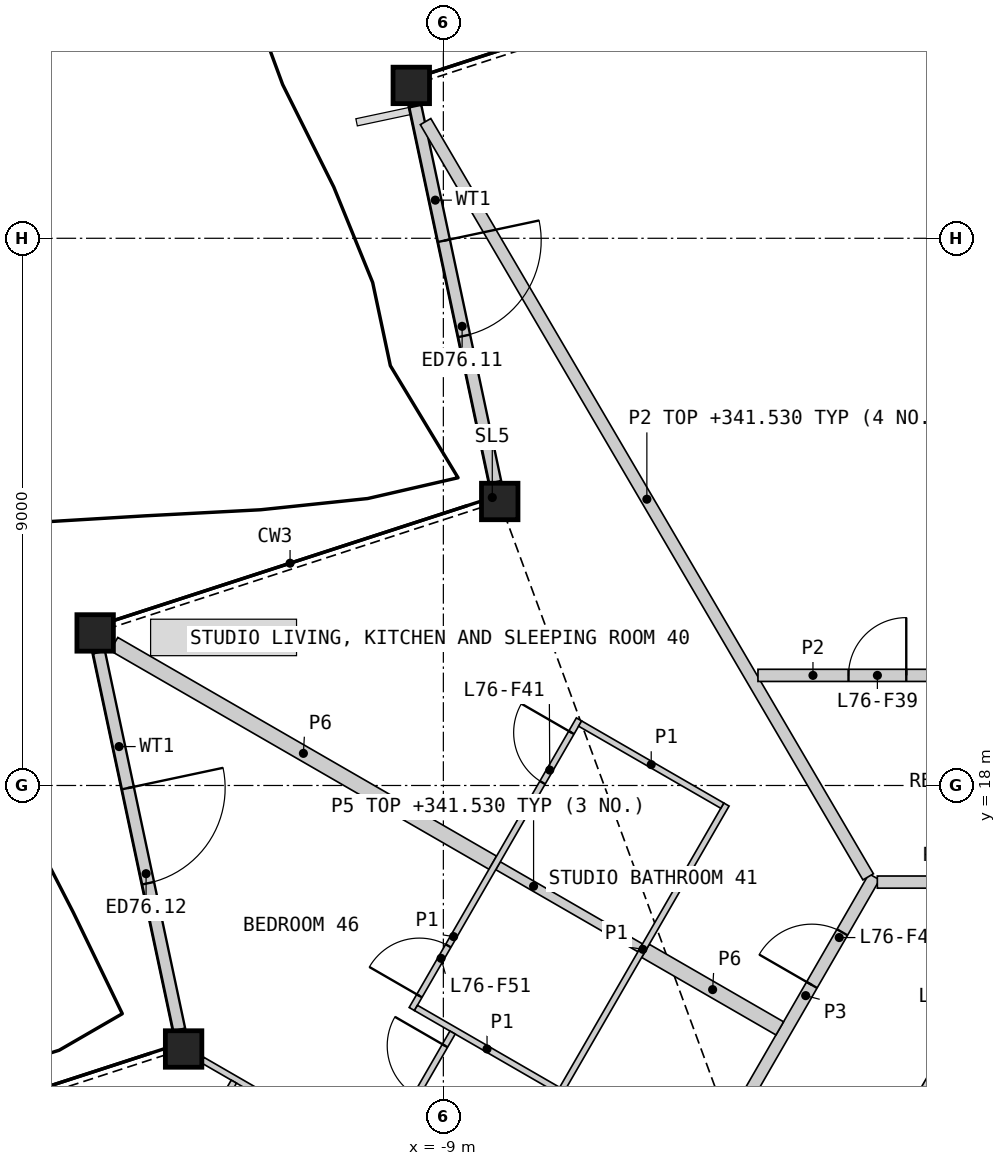
"""IFC4 building model, lengths in metres.
Left out: names, types, materials, properties, quantities, classifications, styles, units other than length and angle.
Written with IfcOpenShell. Run it as: python <this file> out.ifc"""

import sys

from ifc_helpers import new_model, si_unit, direction, frame, frame_2d, origin, origin_2d, place, context, subcontext, project, spatial, rectangle, hollow_rectangle, extrude, element, fill, save


model = new_model("IFC4")
c1 = context("Model", 3, precision=1e-05, world=origin(), true_north=direction((0.0, 1.0)))
c2 = subcontext(c1, "Body", "Model", "MODEL_VIEW")
j1 = project(units=[si_unit("LENGTHUNIT", "METRE"), si_unit("PLANEANGLEUNIT", "RADIAN")], contexts=[c1])
p1 = place(None, origin())
s1 = spatial("IfcSite", under=j1, at=p1, CompositionType="ELEMENT")
p2 = place(p1, origin())
s2 = spatial("IfcBuilding", under=s1, at=p2, CompositionType="ELEMENT")
p3 = place(p2, frame((0.0, 0.0, 339.2)))
s3 = spatial("IfcBuildingStorey", under=s2, at=p3, CompositionType="ELEMENT", Elevation=339.2)
for number, where, z_axis, x_axis in (
    (1, (-9.527, 29.514, 0.0), (0.0, 0.0, 1.0), (1.0, 0.0, 0.0)),
    (2, (-8.073, 22.671, 0.0), (0.0, 0.0, 1.0), (1.0, 0.0, 0.0)),
    (3, (-14.727, 20.509, 0.0), (0.0, 0.0, 1.0), (1.0, 0.0, 0.0)),
    (4, (-13.272, 13.666, 0.0), (0.0, 0.0, 1.0), (1.0, 0.0, 0.0)),
):
    element("IfcColumn", number, at=place(p3, frame(where, z_axis=z_axis, x_axis=x_axis)), inside=s3, PredefinedType="COLUMN", context=c2, shape_type="SweptSolid", body=[
        extrude(hollow_rectangle(XDim=0.6, YDim=0.6, WallThickness=0.04, at=origin_2d()), origin(), (0.0, 0.0, 1.0), 3.4),
    ])
p4 = place(p3, frame((-9.461, 29.174, 0.0), z_axis=(0.0, 0.0, 1.0), x_axis=(0.20791277238, -0.97814737084, 0.0)))
e5 = element("IfcWall", 5, at=p4, inside=s3, PredefinedType="SOLIDWALL", context=c2, shape_type="SweptSolid", body=[
    extrude(rectangle(XDim=6.324, YDim=0.2, at=frame_2d((3.162, 0.0))), origin(), (0.0, 0.0, 1.0), 2.488),
])
p5 = place(p4, frame((2.263, 0.0, 0.0)))
e6 = element("IfcOpeningElement", 6, at=p5, cuts=e5, PredefinedType="OPENING", context=c2, shape_type="SweptSolid", body=[
    extrude(rectangle(XDim=1.6, YDim=2.25, at=frame_2d((0.8, 1.125))), frame((0.0, 0.11, 0.0), z_axis=(0.0, -1.0, 0.0), x_axis=(1.0, 0.0, 0.0)), (0.0, 0.0, 1.0), 0.22),
])
p6 = place(p3, frame((-14.663, 20.192, 0.0), z_axis=(0.0, 0.0, 1.0), x_axis=(0.207897850695, -0.97815054244, 0.0)))
e7 = element("IfcWall", 7, at=p6, inside=s3, PredefinedType="SOLIDWALL", context=c2, shape_type="SweptSolid", body=[
    extrude(rectangle(XDim=6.348, YDim=0.2, at=frame_2d((3.174, 0.0))), origin(), (0.0, 0.0, 1.0), 2.488),
])
p7 = place(p6, frame((2.285, 0.0, 0.0)))
e8 = element("IfcOpeningElement", 8, at=p7, cuts=e7, PredefinedType="OPENING", context=c2, shape_type="SweptSolid", body=[
    extrude(rectangle(XDim=1.6, YDim=2.25, at=frame_2d((0.8, 1.125))), frame((0.0, 0.11, 0.0), z_axis=(0.0, -1.0, 0.0), x_axis=(1.0, 0.0, 0.0)), (0.0, 0.0, 1.0), 0.22),
])
p8 = place(p3, frame((-0.26, 13.961, 0.0), z_axis=(0.0, 0.0, 1.0), x_axis=(-0.49997936161, -0.866037319036, 0.0)))
e9 = element("IfcWall", 9, at=p8, inside=s3, PredefinedType="SHEAR", context=c2, shape_type="SweptSolid", body=[
    extrude(rectangle(XDim=2.66, YDim=0.6, at=frame_2d((1.33, 0.0))), origin(), (0.0, 0.0, 1.0), 3.1),
])
p9 = place(p8, frame((1.05, 0.0, 0.0)))
e10 = element("IfcOpeningElement", 10, at=p9, cuts=e9, PredefinedType="OPENING", context=c2, shape_type="SweptSolid", body=[
    extrude(rectangle(XDim=1.0, YDim=2.1, at=frame_2d((0.5, 1.05))), frame((0.0, 0.31, 0.0), z_axis=(0.0, -1.0, 0.0), x_axis=(1.0, 0.0, 0.0)), (0.0, 0.0, 1.0), 0.62),
])
p10 = place(p3, frame((-14.417, 20.327, 0.0), z_axis=(0.0, 0.0, 1.0), x_axis=(0.866018271907, -0.50001235257, 0.0)))
e11 = element("IfcWall", 11, at=p10, inside=s3, PredefinedType="PARTITIONING", context=c2, shape_type="SweptSolid", body=[
    extrude(rectangle(XDim=7.193, YDim=0.25, at=frame_2d((3.596, 0.0))), origin(), (0.0, 0.0, 1.0), 2.33),
])
p11 = place(p3, frame((-4.169, 12.59, 0.0), z_axis=(0.0, 0.0, 1.0), x_axis=(0.499950370306, 0.866054055606, 0.0)))
e12 = element("IfcWall", 12, at=p11, inside=s3, PredefinedType="PARTITIONING", context=c2, shape_type="SweptSolid", body=[
    extrude(rectangle(XDim=4.513, YDim=0.2, at=frame_2d((2.256, 0.0))), origin(), (0.0, 0.0, 1.0), 3.1),
])
p12 = place(p11, frame((2.459, 0.0, 0.0)))
e13 = element("IfcOpeningElement", 13, at=p12, cuts=e12, PredefinedType="OPENING", context=c2, shape_type="SweptSolid", body=[
    extrude(rectangle(XDim=1.0, YDim=2.1, at=frame_2d((0.5, 1.05))), frame((0.0, 0.11, 0.0), z_axis=(0.0, -1.0, 0.0), x_axis=(1.0, 0.0, 0.0)), (0.0, 0.0, 1.0), 0.22),
])
p13 = place(p3, frame((-1.863, 16.411, 0.0), z_axis=(0.0, 0.0, 1.0), x_axis=(1.0, 0.0, 0.0)))
e14 = element("IfcWall", 14, at=p13, inside=s3, PredefinedType="PARTITIONING", context=c2, shape_type="SweptSolid", body=[
    extrude(rectangle(XDim=3.726, YDim=0.2, at=frame_2d((1.863, 0.0))), origin(), (0.0, 0.0, 1.0), 3.1),
])
p14 = place(p13, frame((1.388, 0.0, 0.0)))
e15 = element("IfcOpeningElement", 15, at=p14, cuts=e14, PredefinedType="OPENING", context=c2, shape_type="SweptSolid", body=[
    extrude(rectangle(XDim=0.95, YDim=2.1, at=frame_2d((0.475, 1.05))), frame((0.0, 0.11, 0.0), z_axis=(0.0, -1.0, 0.0), x_axis=(1.0, 0.0, 0.0)), (0.0, 0.0, 1.0), 0.22),
])
p15 = place(p3, frame((-5.676, 15.28, 0.0), z_axis=(0.0, 0.0, 1.0), x_axis=(0.865989465428, -0.500062241894, 0.0)))
e16 = element("IfcWall", 16, at=p15, inside=s3, PredefinedType="PARTITIONING", context=c2, shape_type="SweptSolid", body=[
    extrude(rectangle(XDim=2.55, YDim=0.25, at=frame_2d((1.275, 0.0))), origin(), (0.0, 0.0, 1.0), 2.33),
])
p16 = place(p3, frame((-9.292, 28.919, 0.0), z_axis=(0.0, 0.0, 1.0), x_axis=(0.505558038556, -0.862792599442, 0.0)))
e17 = element("IfcWall", 17, at=p16, inside=s3, PredefinedType="PARTITIONING", context=c2, shape_type="SweptSolid", body=[
    extrude(rectangle(XDim=14.397, YDim=0.2, at=frame_2d((7.199, 0.0))), origin(), (0.0, 0.0, 1.0), 2.33),
])
p17 = place(p3, frame((-3.826, 19.811, 0.0), z_axis=(0.0, 0.0, 1.0), x_axis=(1.0, 0.0, 0.0)))
e18 = element("IfcWall", 18, at=p17, inside=s3, PredefinedType="PARTITIONING", context=c2, shape_type="SweptSolid", body=[
    extrude(rectangle(XDim=3.618, YDim=0.2, at=frame_2d((1.809, 0.0))), origin(), (0.0, 0.0, 1.0), 2.33),
])
p18 = place(p17, frame((1.489, 0.0, 0.0)))
e19 = element("IfcOpeningElement", 19, at=p18, cuts=e18, PredefinedType="OPENING", context=c2, shape_type="SweptSolid", body=[
    extrude(rectangle(XDim=0.95, YDim=2.1, at=frame_2d((0.475, 1.05))), frame((0.0, 0.11, 0.0), z_axis=(0.0, -1.0, 0.0), x_axis=(1.0, 0.0, 0.0)), (0.0, 0.0, 1.0), 0.22),
])
p19 = place(p3, frame((-8.101, 16.68, 0.0), z_axis=(0.0, 0.0, 1.0), x_axis=(0.866019956843, -0.50000943426, 0.0)))
e20 = element("IfcWall", 20, at=p19, inside=s3, PredefinedType="PLUMBINGWALL", context=c2, shape_type="SweptSolid", body=[
    extrude(rectangle(XDim=2.7, YDim=0.15, at=frame_2d((1.35, 0.0))), origin(), (0.0, 0.0, 1.0), 2.33),
])
p20 = place(p3, frame((-12.962, 13.485, 0.0), z_axis=(0.0, 0.0, 1.0), x_axis=(0.866021168401, -0.500007335828, 0.0)))
e21 = element("IfcWall", 21, at=p20, inside=s3, PredefinedType="PARTITIONING", context=c2, shape_type="SweptSolid", body=[
    extrude(rectangle(XDim=7.962, YDim=0.1, at=frame_2d((3.981, 0.0))), origin(), (0.0, 0.0, 1.0), 2.33),
])
p21 = place(p20, frame((2.154, 0.0, 0.0)))
e22 = element("IfcOpeningElement", 22, at=p21, cuts=e21, PredefinedType="OPENING", context=c2, shape_type="SweptSolid", body=[
    extrude(rectangle(XDim=0.95, YDim=2.1, at=frame_2d((0.475, 1.05))), frame((0.0, 0.06, 0.0), z_axis=(0.0, -1.0, 0.0), x_axis=(1.0, 0.0, 0.0)), (0.0, 0.0, 1.0), 0.12),
])
p22 = place(p3, frame((-7.094, 12.924, 0.0), z_axis=(0.0, 0.0, 1.0), x_axis=(0.499996545922, 0.866027397988, 0.0)))
e23 = element("IfcWall", 23, at=p22, inside=s3, PredefinedType="PARTITIONING", context=c2, shape_type="SweptSolid", body=[
    extrude(rectangle(XDim=5.5, YDim=0.1, at=frame_2d((2.75, 0.0))), origin(), (0.0, 0.0, 1.0), 2.33),
])
p23 = place(p3, frame((-9.519, 14.323, 0.0), z_axis=(0.0, 0.0, 1.0), x_axis=(0.499996545922, 0.866027397988, 0.0)))
e24 = element("IfcWall", 24, at=p23, inside=s3, PredefinedType="PARTITIONING", context=c2, shape_type="SweptSolid", body=[
    extrude(rectangle(XDim=5.5, YDim=0.1, at=frame_2d((2.75, 0.0))), origin(), (0.0, 0.0, 1.0), 2.33),
])
p24 = place(p23, frame((4.3, 0.0, 0.0)))
e25 = element("IfcOpeningElement", 25, at=p24, cuts=e24, PredefinedType="OPENING", context=c2, shape_type="SweptSolid", body=[
    extrude(rectangle(XDim=0.95, YDim=2.1, at=frame_2d((0.475, 1.05))), frame((0.0, 0.06, 0.0), z_axis=(0.0, -1.0, 0.0), x_axis=(1.0, 0.0, 0.0)), (0.0, 0.0, 1.0), 0.12),
])
p25 = place(p23, frame((0.25, 0.0, 0.0)))
e26 = element("IfcOpeningElement", 26, at=p25, cuts=e24, PredefinedType="OPENING", context=c2, shape_type="SweptSolid", body=[
    extrude(rectangle(XDim=0.95, YDim=2.1, at=frame_2d((0.475, 1.05))), frame((0.0, 0.06, 0.0), z_axis=(0.0, -1.0, 0.0), x_axis=(1.0, 0.0, 0.0)), (0.0, 0.0, 1.0), 0.12),
])
p26 = place(p3, frame((-14.994, 8.714, 0.0), z_axis=(0.0, 0.0, 1.0), x_axis=(0.500012659481, 0.866018094706, 0.0)))
e27 = element("IfcWall", 27, at=p26, inside=s3, PredefinedType="PARTITIONING", context=c2, shape_type="SweptSolid", body=[
    extrude(rectangle(XDim=5.097, YDim=0.1, at=frame_2d((2.549, 0.0))), origin(), (0.0, 0.0, 1.0), 2.33),
])
p27 = place(p26, frame((2.175, 0.0, 0.0)))
e28 = element("IfcOpeningElement", 28, at=p27, cuts=e27, PredefinedType="OPENING", context=c2, shape_type="SweptSolid", body=[
    extrude(rectangle(XDim=0.95, YDim=2.1, at=frame_2d((0.475, 1.05))), frame((0.0, 0.06, 0.0), z_axis=(0.0, -1.0, 0.0), x_axis=(1.0, 0.0, 0.0)), (0.0, 0.0, 1.0), 0.12),
])
for number, where, z_axis, x_axis in (
    (29, (-9.451, 14.342, 0.0), (0.0, 0.0, 1.0), (0.866, -0.5, 0.0)),
    (30, (-6.751, 19.018, 0.0), (0.0, 0.0, 1.0), (0.866, -0.5, 0.0)),
):
    element("IfcWall", number, at=place(p3, frame(where, z_axis=z_axis, x_axis=x_axis)), inside=s3, PredefinedType="PARTITIONING", context=c2, shape_type="SweptSolid", body=[
        extrude(rectangle(XDim=2.7, YDim=0.1, at=frame_2d((1.35, 0.0))), origin(), (0.0, 0.0, 1.0), 2.33),
    ])
p28 = place(p3, frame((-10.047, 11.86, 0.0), z_axis=(0.0, 0.0, 1.0), x_axis=(0.500092661743, 0.865971898892, 0.0)))
e31 = element("IfcWall", 31, at=p28, inside=s3, PredefinedType="PARTITIONING", context=c2, shape_type="SweptSolid", body=[
    extrude(rectangle(XDim=2.397, YDim=0.1, at=frame_2d((1.199, 0.0))), origin(), (0.0, 0.0, 1.0), 2.33),
])
p29 = place(p28, frame((1.198, 0.0, 0.0)))
e32 = element("IfcOpeningElement", 32, at=p29, cuts=e31, PredefinedType="OPENING", context=c2, shape_type="SweptSolid", body=[
    extrude(rectangle(XDim=0.95, YDim=2.1, at=frame_2d((0.475, 1.05))), frame((0.0, 0.06, 0.0), z_axis=(0.0, -1.0, 0.0), x_axis=(1.0, 0.0, 0.0)), (0.0, 0.0, 1.0), 0.12),
])
p30 = place(p5, origin())
e33 = element("IfcDoor", 33, at=p30, inside=s3, OperationType="DOUBLE_DOOR_SINGLE_SWING", PredefinedType="DOOR", context=c2, shape_type="SweptSolid", body=[
    extrude(rectangle(XDim=1.6, YDim=2.25, at=frame_2d((0.8, 1.125))), frame((0.0, 0.025, 0.0), z_axis=(0.0, -1.0, 0.0), x_axis=(1.0, 0.0, 0.0)), (0.0, 0.0, 1.0), 0.05),
])
fill(e6, e33)
p31 = place(p7, origin())
e34 = element("IfcDoor", 34, at=p31, inside=s3, OperationType="DOUBLE_DOOR_SINGLE_SWING", PredefinedType="DOOR", context=c2, shape_type="SweptSolid", body=[
    extrude(rectangle(XDim=1.6, YDim=2.25, at=frame_2d((0.8, 1.125))), frame((0.0, 0.025, 0.0), z_axis=(0.0, -1.0, 0.0), x_axis=(1.0, 0.0, 0.0)), (0.0, 0.0, 1.0), 0.05),
])
fill(e8, e34)
p32 = place(p18, origin())
e35 = element("IfcDoor", 35, at=p32, inside=s3, OperationType="SINGLE_SWING_RIGHT", PredefinedType="DOOR", context=c2, shape_type="SweptSolid", body=[
    extrude(rectangle(XDim=0.95, YDim=2.1, at=frame_2d((0.475, 1.05))), frame((0.0, 0.025, 0.0), z_axis=(0.0, -1.0, 0.0), x_axis=(1.0, 0.0, 0.0)), (0.0, 0.0, 1.0), 0.05),
])
fill(e19, e35)
p33 = place(p12, origin())
e36 = element("IfcDoor", 36, at=p33, inside=s3, OperationType="SINGLE_SWING_LEFT", PredefinedType="DOOR", context=c2, shape_type="SweptSolid", body=[
    extrude(rectangle(XDim=1.0, YDim=2.1, at=frame_2d((0.5, 1.05))), frame((0.0, 0.025, 0.0), z_axis=(0.0, -1.0, 0.0), x_axis=(1.0, 0.0, 0.0)), (0.0, 0.0, 1.0), 0.05),
])
fill(e13, e36)
p34 = place(p24, origin())
e37 = element("IfcDoor", 37, at=p34, inside=s3, OperationType="SINGLE_SWING_RIGHT", PredefinedType="DOOR", context=c2, shape_type="SweptSolid", body=[
    extrude(rectangle(XDim=0.95, YDim=2.1, at=frame_2d((0.475, 1.05))), frame((0.0, 0.025, 0.0), z_axis=(0.0, -1.0, 0.0), x_axis=(1.0, 0.0, 0.0)), (0.0, 0.0, 1.0), 0.05),
])
fill(e25, e37)
p35 = place(p29, origin())
e38 = element("IfcDoor", 38, at=p35, inside=s3, OperationType="SINGLE_SWING_RIGHT", PredefinedType="DOOR", context=c2, shape_type="SweptSolid", body=[
    extrude(rectangle(XDim=0.95, YDim=2.1, at=frame_2d((0.475, 1.05))), frame((0.0, 0.025, 0.0), z_axis=(0.0, -1.0, 0.0), x_axis=(1.0, 0.0, 0.0)), (0.0, 0.0, 1.0), 0.05),
])
fill(e32, e38)
p36 = place(p25, origin())
e39 = element("IfcDoor", 39, at=p36, inside=s3, OperationType="SINGLE_SWING_LEFT", PredefinedType="DOOR", context=c2, shape_type="SweptSolid", body=[
    extrude(rectangle(XDim=0.95, YDim=2.1, at=frame_2d((0.475, 1.05))), frame((0.0, 0.025, 0.0), z_axis=(0.0, -1.0, 0.0), x_axis=(1.0, 0.0, 0.0)), (0.0, 0.0, 1.0), 0.05),
])
fill(e26, e39)
save(model, sys.argv[1])
